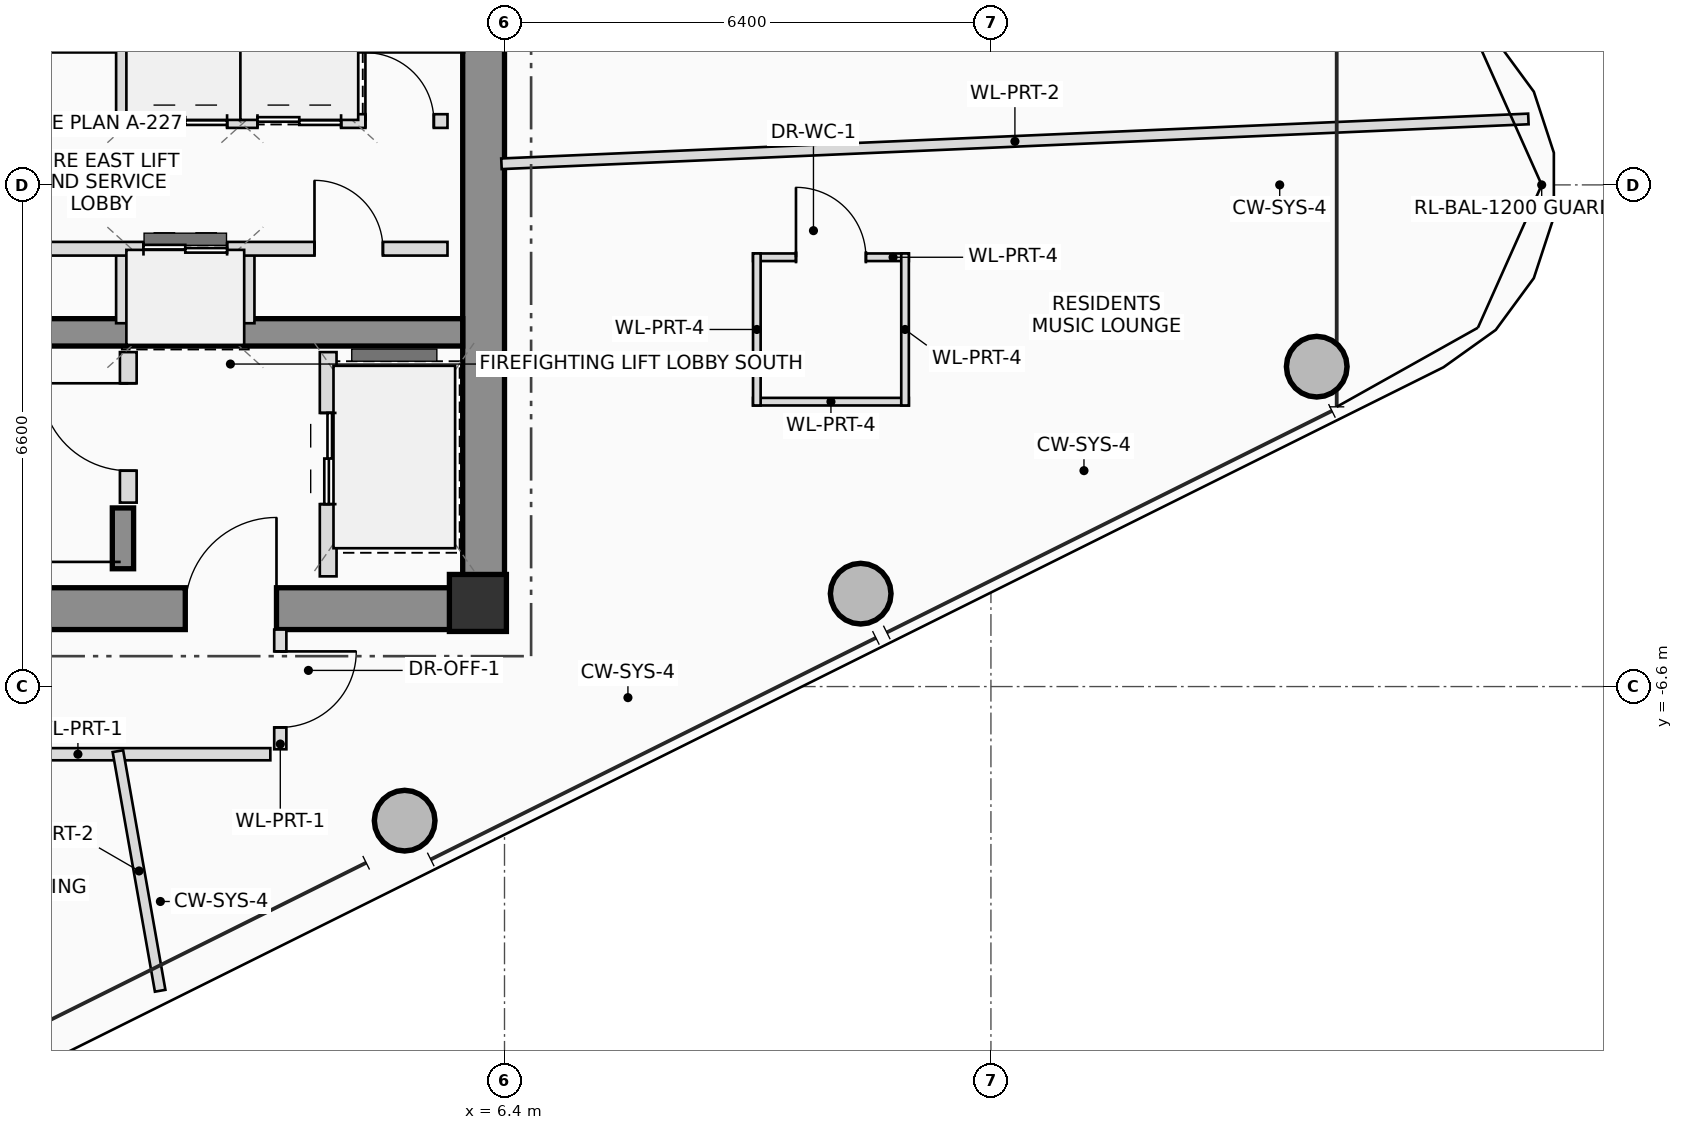
"""IFC4 building model, lengths in metres.
Left out: names, types, materials, properties, quantities, classifications, styles, units other than length and angle.
Written with IfcOpenShell. Run it as: python <this file> out.ifc"""

import sys

from ifc_helpers import new_model, si_unit, direction, frame, frame_2d, origin, origin_2d, place, context, subcontext, project, spatial, rectangle, hollow_circle, extrude, source, transform, mapped, element, fill, save


model = new_model("IFC4")
c1 = context("Model", 3, precision=1e-05, world=origin(), true_north=direction((0.0, 1.0)))
c2 = subcontext(c1, "Body", "Model", "MODEL_VIEW")
j1 = project(units=[si_unit("LENGTHUNIT", "METRE"), si_unit("PLANEANGLEUNIT", "RADIAN")], contexts=[c1])
p1 = place(None, origin())
s1 = spatial("IfcSite", under=j1, at=p1, CompositionType="ELEMENT")
p2 = place(p1, origin())
s2 = spatial("IfcBuilding", under=s1, at=p2, CompositionType="ELEMENT")
p3 = place(p2, frame((0.0, 0.0, 307.1)))
s3 = spatial("IfcBuildingStorey", under=s2, at=p3, CompositionType="ELEMENT", Elevation=307.1)
m1 = source(origin(), c2, "Body", "SweptSolid", [
    extrude(rectangle(XDim=0.75, YDim=0.75, at=origin_2d()), origin(), (0.0, 0.0, 1.0), 3.45),
])
p4 = place(p3, frame((6.05, -5.5, 0.0), z_axis=(0.0, 0.0, 1.0), x_axis=(1.0, 0.0, 0.0)))
e1 = element("IfcColumn", 1, at=p4, inside=s3, PredefinedType="COLUMN", context=c2, shape_type="MappedRepresentation", body=[
    mapped(m1, transform((0.0, 0.0, 0.0), scale=1.0)),
])
p5 = place(p3, frame((-6.4, -5.575, 0.0), z_axis=(0.0, 0.0, 1.0), x_axis=(1.0, 0.0, 0.0)))
e2 = element("IfcWall", 2, at=p5, inside=s3, PredefinedType="SHEAR", context=c2, shape_type="SweptSolid", body=[
    extrude(rectangle(XDim=12.8, YDim=0.55, at=frame_2d((6.4, 0.0))), origin(), (0.0, 0.0, 1.0), 3.45),
])
p6 = place(p5, frame((8.6, 0.0, 0.0)))
e3 = element("IfcOpeningElement", 3, at=p6, cuts=e2, PredefinedType="OPENING", context=c2, shape_type="SweptSolid", body=[
    extrude(rectangle(XDim=1.2, YDim=2.2, at=frame_2d((0.6, 1.1))), frame((0.0, 0.285, 0.0), z_axis=(0.0, -1.0, 0.0), x_axis=(1.0, 0.0, 0.0)), (0.0, 0.0, 1.0), 0.57),
])
p7 = place(p3, frame((6.125, -5.3, 0.0), z_axis=(0.0, 0.0, 1.0), x_axis=(0.0, 1.0, 0.0)))
e4 = element("IfcWall", 4, at=p7, inside=s3, PredefinedType="SHEAR", context=c2, shape_type="SweptSolid", body=[
    extrude(rectangle(XDim=10.6, YDim=0.55, at=frame_2d((5.3, 0.0))), origin(), (0.0, 0.0, 1.0), 3.45),
])
p8 = place(p3, frame((-5.85, -1.94, 0.0), z_axis=(0.0, 0.0, 1.0), x_axis=(1.0, 0.0, 0.0)))
e5 = element("IfcWall", 5, at=p8, inside=s3, PredefinedType="SHEAR", context=c2, shape_type="SweptSolid", body=[
    extrude(rectangle(XDim=11.7, YDim=0.36, at=frame_2d((5.85, 0.0))), origin(), (0.0, 0.0, 1.0), 3.45),
])
p9 = place(p3, frame((1.38, -5.05, 0.0), z_axis=(0.0, 0.0, 1.0), x_axis=(0.0, 1.0, 0.0)))
e6 = element("IfcWall", 6, at=p9, inside=s3, PredefinedType="SHEAR", context=c2, shape_type="SweptSolid", body=[
    extrude(rectangle(XDim=0.8, YDim=0.28, at=frame_2d((0.4, 0.0))), origin(), (0.0, 0.0, 1.0), 3.45),
])
m2 = source(origin(), c2, "Body", "SweptSolid", [
    extrude(hollow_circle(Radius=0.4, WallThickness=0.028, at=origin_2d()), origin(), (0.0, 0.0, 1.0), 3.45),
])
for number, where, z_axis, x_axis in (
    (7, (5.086, -8.364, 0.0), (0.0, 0.0, 1.0), (1.0, 0.0, 0.0)),
    (8, (11.086, -5.378, 0.0), (0.0, 0.0, 1.0), (1.0, 0.0, 0.0)),
    (9, (17.087, -2.392, 0.0), (0.0, 0.0, 1.0), (1.0, 0.0, 0.0)),
):
    element("IfcColumn", number, at=place(p3, frame(where, z_axis=z_axis, x_axis=x_axis)), inside=s3, PredefinedType="COLUMN", context=c2, shape_type="MappedRepresentation", body=[
        mapped(m2, transform((0.0, 0.0, 0.0), scale=1.0)),
    ])
p10 = place(p3, frame((1.45, -4.18, 0.0), z_axis=(0.0, 0.0, 1.0), x_axis=(0.0, 1.0, 0.0)))
e10 = element("IfcWall", 10, at=p10, inside=s3, PredefinedType="PLUMBINGWALL", context=c2, shape_type="SweptSolid", body=[
    extrude(rectangle(XDim=1.98, YDim=0.22, at=frame_2d((0.99, 0.0))), origin(), (0.0, 0.0, 1.0), 3.25),
])
p11 = place(p10, frame((0.42, 0.0, 0.0)))
e11 = element("IfcOpeningElement", 11, at=p11, cuts=e10, PredefinedType="OPENING", context=c2, shape_type="SweptSolid", body=[
    extrude(rectangle(XDim=1.15, YDim=2.15, at=frame_2d((0.575, 1.075))), frame((0.0, 0.12, 0.0), z_axis=(0.0, -1.0, 0.0), x_axis=(1.0, 0.0, 0.0)), (0.0, 0.0, 1.0), 0.24),
])
p12 = place(p3, frame((4.08, -5.15, 0.0), z_axis=(0.0, 0.0, 1.0), x_axis=(0.0, 1.0, 0.0)))
e12 = element("IfcWall", 12, at=p12, inside=s3, PredefinedType="PLUMBINGWALL", context=c2, shape_type="SweptSolid", body=[
    extrude(rectangle(XDim=2.95, YDim=0.22, at=frame_2d((1.475, 0.0))), origin(), (0.0, 0.0, 1.0), 3.25),
])
p13 = place(p12, frame((0.95, 0.0, 0.0)))
e13 = element("IfcOpeningElement", 13, at=p13, cuts=e12, PredefinedType="OPENING", context=c2, shape_type="SweptSolid", body=[
    extrude(rectangle(XDim=1.2, YDim=2.25, at=frame_2d((0.6, 1.125))), frame((0.0, 0.12, 0.0), z_axis=(0.0, -1.0, 0.0), x_axis=(1.0, 0.0, 0.0)), (0.0, 0.0, 1.0), 0.24),
])
for number, where, z_axis, x_axis in (
    (14, (1.38, 0.84, 0.0), (0.0, 0.0, 1.0), (0.0, 1.0, 0.0)),
    (15, (1.38, -1.82, 0.0), (0.0, 0.0, 1.0), (0.0, 1.0, 0.0)),
    (16, (3.02, 0.84, 0.0), (0.0, 0.0, 1.0), (0.0, 1.0, 0.0)),
    (17, (4.38, 0.84, 0.0), (0.0, 0.0, 1.0), (0.0, 1.0, 0.0)),
    (18, (3.02, -1.82, 0.0), (0.0, 0.0, 1.0), (0.0, 1.0, 0.0)),
):
    element("IfcWall", number, at=place(p3, frame(where, z_axis=z_axis, x_axis=x_axis)), inside=s3, PredefinedType="PLUMBINGWALL", context=c2, shape_type="SweptSolid", body=[
        extrude(rectangle(XDim=0.98, YDim=0.18, at=frame_2d((0.49, 0.0))), origin(), (0.0, 0.0, 1.0), 3.25),
    ])
p14 = place(p3, frame((-5.68, 0.84, 0.0), z_axis=(0.0, 0.0, 1.0), x_axis=(1.0, 0.0, 0.0)))
e19 = element("IfcWall", 19, at=p14, inside=s3, PredefinedType="PLUMBINGWALL", context=c2, shape_type="SweptSolid", body=[
    extrude(rectangle(XDim=11.33, YDim=0.18, at=frame_2d((5.665, 0.0))), origin(), (0.0, 0.0, 1.0), 3.25),
])
p15 = place(p14, frame((3.13, 0.0, 0.0)))
e20 = element("IfcOpeningElement", 20, at=p15, cuts=e19, PredefinedType="OPENING", context=c2, shape_type="SweptSolid", body=[
    extrude(rectangle(XDim=0.9, YDim=2.05, at=frame_2d((0.45, 1.025))), frame((0.0, 0.1, 0.0), z_axis=(0.0, -1.0, 0.0), x_axis=(1.0, 0.0, 0.0)), (0.0, 0.0, 1.0), 0.2),
])
p16 = place(p14, frame((7.33, 0.0, 0.0)))
e21 = element("IfcOpeningElement", 21, at=p16, cuts=e19, PredefinedType="OPENING", context=c2, shape_type="SweptSolid", body=[
    extrude(rectangle(XDim=1.1, YDim=2.2, at=frame_2d((0.55, 1.1))), frame((0.0, 0.1, 0.0), z_axis=(0.0, -1.0, 0.0), x_axis=(1.0, 0.0, 0.0)), (0.0, 0.0, 1.0), 0.2),
])
p17 = place(p14, frame((8.83, 0.0, 0.0)))
e22 = element("IfcOpeningElement", 22, at=p17, cuts=e19, PredefinedType="OPENING", context=c2, shape_type="SweptSolid", body=[
    extrude(rectangle(XDim=1.1, YDim=2.2, at=frame_2d((0.55, 1.1))), frame((0.0, 0.1, 0.0), z_axis=(0.0, -1.0, 0.0), x_axis=(1.0, 0.0, 0.0)), (0.0, 0.0, 1.0), 0.2),
])
p18 = place(p14, frame((10.25, 0.0, 0.0)))
e23 = element("IfcOpeningElement", 23, at=p18, cuts=e19, PredefinedType="OPENING", context=c2, shape_type="SweptSolid", body=[
    extrude(rectangle(XDim=0.9, YDim=2.05, at=frame_2d((0.45, 1.025))), frame((0.0, 0.1, 0.0), z_axis=(0.0, -1.0, 0.0), x_axis=(1.0, 0.0, 0.0)), (0.0, 0.0, 1.0), 0.2),
])
p19 = place(p3, frame((-5.68, -0.84, 0.0), z_axis=(0.0, 0.0, 1.0), x_axis=(1.0, 0.0, 0.0)))
e24 = element("IfcWall", 24, at=p19, inside=s3, PredefinedType="PLUMBINGWALL", context=c2, shape_type="SweptSolid", body=[
    extrude(rectangle(XDim=11.33, YDim=0.18, at=frame_2d((5.665, 0.0))), origin(), (0.0, 0.0, 1.0), 3.25),
])
p20 = place(p19, frame((3.13, 0.0, 0.0)))
e25 = element("IfcOpeningElement", 25, at=p20, cuts=e24, PredefinedType="OPENING", context=c2, shape_type="SweptSolid", body=[
    extrude(rectangle(XDim=0.9, YDim=2.05, at=frame_2d((0.45, 1.025))), frame((0.0, 0.1, 0.0), z_axis=(0.0, -1.0, 0.0), x_axis=(1.0, 0.0, 0.0)), (0.0, 0.0, 1.0), 0.2),
])
p21 = place(p19, frame((7.33, 0.0, 0.0)))
e26 = element("IfcOpeningElement", 26, at=p21, cuts=e24, PredefinedType="OPENING", context=c2, shape_type="SweptSolid", body=[
    extrude(rectangle(XDim=1.1, YDim=2.2, at=frame_2d((0.55, 1.1))), frame((0.0, 0.1, 0.0), z_axis=(0.0, -1.0, 0.0), x_axis=(1.0, 0.0, 0.0)), (0.0, 0.0, 1.0), 0.2),
])
p22 = place(p19, frame((9.58, 0.0, 0.0)))
e27 = element("IfcOpeningElement", 27, at=p22, cuts=e24, PredefinedType="OPENING", context=c2, shape_type="SweptSolid", body=[
    extrude(rectangle(XDim=0.9, YDim=2.05, at=frame_2d((0.45, 1.025))), frame((0.0, 0.1, 0.0), z_axis=(0.0, -1.0, 0.0), x_axis=(1.0, 0.0, 0.0)), (0.0, 0.0, 1.0), 0.2),
])
p23 = place(p3, frame((9.67, -0.952, 0.0), z_axis=(0.0, 0.0, 1.0), x_axis=(1.0, 0.0, 0.0)))
e28 = element("IfcWall", 28, at=p23, inside=s3, PredefinedType="PARTITIONING", context=c2, shape_type="SweptSolid", body=[
    extrude(rectangle(XDim=2.05, YDim=0.1, at=frame_2d((1.025, 0.0))), origin(), (0.0, 0.0, 1.0), 2.905),
])
p24 = place(p23, frame((0.565, 0.0, 0.0)))
e29 = element("IfcOpeningElement", 29, at=p24, cuts=e28, PredefinedType="OPENING", context=c2, shape_type="SweptSolid", body=[
    extrude(rectangle(XDim=0.92, YDim=2.1, at=frame_2d((0.46, 1.05))), frame((0.0, 0.06, 0.0), z_axis=(0.0, -1.0, 0.0), x_axis=(1.0, 0.0, 0.0)), (0.0, 0.0, 1.0), 0.12),
])
p25 = place(p3, frame((11.72, -2.852, 0.0), z_axis=(0.0, 0.0, 1.0), x_axis=(-1.0, 0.0, 0.0)))
e30 = element("IfcWall", 30, at=p25, inside=s3, PredefinedType="PARTITIONING", context=c2, shape_type="SweptSolid", body=[
    extrude(rectangle(XDim=2.05, YDim=0.1, at=frame_2d((1.025, 0.0))), origin(), (0.0, 0.0, 1.0), 2.905),
])
for number, where, z_axis, x_axis in (
    (31, (11.67, -0.902, 0.0), (0.0, 0.0, 1.0), (0.0, -1.0, 0.0)),
    (32, (9.72, -2.902, 0.0), (0.0, 0.0, 1.0), (0.0, 1.0, 0.0)),
):
    element("IfcWall", number, at=place(p3, frame(where, z_axis=z_axis, x_axis=x_axis)), inside=s3, PredefinedType="PARTITIONING", context=c2, shape_type="SweptSolid", body=[
        extrude(rectangle(XDim=2.0, YDim=0.1, at=frame_2d((1.0, 0.0))), origin(), (0.0, 0.0, 1.0), 3.25),
    ])
p26 = place(p3, frame((3.45, -5.85, 0.0), z_axis=(0.0, 0.0, 1.0), x_axis=(0.0, -1.0, 0.0)))
e33 = element("IfcWall", 33, at=p26, inside=s3, PredefinedType="PARTITIONING", context=c2, shape_type="SweptSolid", body=[
    extrude(rectangle(XDim=1.575, YDim=0.16, at=frame_2d((0.787, 0.0))), origin(), (0.0, 0.0, 1.0), 2.855),
])
p27 = place(p26, frame((0.287, 0.0, 0.0)))
e34 = element("IfcOpeningElement", 34, at=p27, cuts=e33, PredefinedType="OPENING", context=c2, shape_type="SweptSolid", body=[
    extrude(rectangle(XDim=1.0, YDim=2.25, at=frame_2d((0.5, 1.125))), frame((0.0, 0.09, 0.0), z_axis=(0.0, -1.0, 0.0), x_axis=(1.0, 0.0, 0.0)), (0.0, 0.0, 1.0), 0.18),
])
p28 = place(p3, frame((3.319, -7.49, 0.0), z_axis=(0.0, 0.0, 1.0), x_axis=(-1.0, 0.0, 0.0)))
e35 = element("IfcWall", 35, at=p28, inside=s3, PredefinedType="PARTITIONING", context=c2, shape_type="SweptSolid", body=[
    extrude(rectangle(XDim=9.679, YDim=0.16, at=frame_2d((4.84, 0.0))), origin(), (0.0, 0.0, 1.0), 2.655),
])
p29 = place(p28, frame((5.213, 0.0, 0.0)))
e36 = element("IfcOpeningElement", 36, at=p29, cuts=e35, PredefinedType="OPENING", context=c2, shape_type="SweptSolid", body=[
    extrude(rectangle(XDim=1.05, YDim=2.2, at=frame_2d((0.525, 1.1))), frame((0.0, 0.09, 0.0), z_axis=(0.0, -1.0, 0.0), x_axis=(1.0, 0.0, 0.0)), (0.0, 0.0, 1.0), 0.18),
])
p30 = place(p3, frame((6.36, 0.278, 0.0), z_axis=(0.0, 0.0, 1.0), x_axis=(0.999047623791, 0.043633076864, 0.0)))
e37 = element("IfcWall", 37, at=p30, inside=s3, PredefinedType="PARTITIONING", context=c2, shape_type="SweptSolid", body=[
    extrude(rectangle(XDim=13.524, YDim=0.14, at=frame_2d((6.762, 0.0))), origin(), (0.0, 0.0, 1.0), 2.815),
])
p31 = place(p3, frame((1.314, -7.45, 0.0), z_axis=(0.0, 0.0, 1.0), x_axis=(0.173619966433, -0.984812726997, 0.0)))
e38 = element("IfcWall", 38, at=p31, inside=s3, PredefinedType="PARTITIONING", context=c2, shape_type="SweptSolid", body=[
    extrude(rectangle(XDim=3.2, YDim=0.14, at=frame_2d((1.6, 0.0))), origin(), (0.0, 0.0, 1.0), 2.815),
])
p32 = place(p6, origin())
e39 = element("IfcDoor", 39, at=p32, inside=s3, OperationType="SINGLE_SWING_RIGHT", PredefinedType="DOOR", context=c2, shape_type="SweptSolid", body=[
    extrude(rectangle(XDim=1.2, YDim=2.2, at=frame_2d((0.6, 1.1))), frame((0.0, 0.025, 0.0), z_axis=(0.0, -1.0, 0.0), x_axis=(1.0, 0.0, 0.0)), (0.0, 0.0, 1.0), 0.05),
])
fill(e3, e39)
p33 = place(p11, origin())
e40 = element("IfcDoor", 40, at=p33, inside=s3, OperationType="SINGLE_SWING_RIGHT", PredefinedType="DOOR", context=c2, shape_type="SweptSolid", body=[
    extrude(rectangle(XDim=1.15, YDim=2.15, at=frame_2d((0.575, 1.075))), frame((0.0, 0.025, 0.0), z_axis=(0.0, -1.0, 0.0), x_axis=(1.0, 0.0, 0.0)), (0.0, 0.0, 1.0), 0.05),
])
fill(e11, e40)
p34 = place(p13, origin())
e41 = element("IfcDoor", 41, at=p34, inside=s3, OperationType="DOUBLE_DOOR_SLIDING", PredefinedType="DOOR", context=c2, shape_type="SweptSolid", body=[
    extrude(rectangle(XDim=1.2, YDim=2.25, at=frame_2d((0.6, 1.125))), frame((0.0, 0.025, 0.0), z_axis=(0.0, -1.0, 0.0), x_axis=(1.0, 0.0, 0.0)), (0.0, 0.0, 1.0), 0.05),
])
fill(e13, e41)
p35 = place(p16, origin())
e42 = element("IfcDoor", 42, at=p35, inside=s3, OperationType="DOUBLE_DOOR_SLIDING", PredefinedType="DOOR", context=c2, shape_type="SweptSolid", body=[
    extrude(rectangle(XDim=1.1, YDim=2.2, at=frame_2d((0.55, 1.1))), frame((0.0, 0.025, 0.0), z_axis=(0.0, -1.0, 0.0), x_axis=(1.0, 0.0, 0.0)), (0.0, 0.0, 1.0), 0.05),
])
fill(e21, e42)
p36 = place(p17, origin())
e43 = element("IfcDoor", 43, at=p36, inside=s3, OperationType="DOUBLE_DOOR_SLIDING", PredefinedType="DOOR", context=c2, shape_type="SweptSolid", body=[
    extrude(rectangle(XDim=1.1, YDim=2.2, at=frame_2d((0.55, 1.1))), frame((0.0, 0.025, 0.0), z_axis=(0.0, -1.0, 0.0), x_axis=(1.0, 0.0, 0.0)), (0.0, 0.0, 1.0), 0.05),
])
fill(e22, e43)
p37 = place(p18, origin())
e44 = element("IfcDoor", 44, at=p37, inside=s3, OperationType="SINGLE_SWING_LEFT", PredefinedType="DOOR", context=c2, shape_type="SweptSolid", body=[
    extrude(rectangle(XDim=0.9, YDim=2.05, at=frame_2d((0.45, 1.025))), frame((0.0, 0.025, 0.0), z_axis=(0.0, -1.0, 0.0), x_axis=(1.0, 0.0, 0.0)), (0.0, 0.0, 1.0), 0.05),
])
fill(e23, e44)
p38 = place(p21, origin())
e45 = element("IfcDoor", 45, at=p38, inside=s3, OperationType="DOUBLE_DOOR_SLIDING", PredefinedType="DOOR", context=c2, shape_type="SweptSolid", body=[
    extrude(rectangle(XDim=1.1, YDim=2.2, at=frame_2d((0.55, 1.1))), frame((0.0, 0.025, 0.0), z_axis=(0.0, -1.0, 0.0), x_axis=(1.0, 0.0, 0.0)), (0.0, 0.0, 1.0), 0.05),
])
fill(e26, e45)
p39 = place(p22, origin())
e46 = element("IfcDoor", 46, at=p39, inside=s3, OperationType="SINGLE_SWING_LEFT", PredefinedType="DOOR", context=c2, shape_type="SweptSolid", body=[
    extrude(rectangle(XDim=0.9, YDim=2.05, at=frame_2d((0.45, 1.025))), frame((0.0, 0.025, 0.0), z_axis=(0.0, -1.0, 0.0), x_axis=(1.0, 0.0, 0.0)), (0.0, 0.0, 1.0), 0.05),
])
fill(e27, e46)
p40 = place(p24, origin())
e47 = element("IfcDoor", 47, at=p40, inside=s3, OperationType="SINGLE_SWING_LEFT", PredefinedType="DOOR", context=c2, shape_type="SweptSolid", body=[
    extrude(rectangle(XDim=0.92, YDim=2.1, at=frame_2d((0.46, 1.05))), frame((0.0, 0.025, 0.0), z_axis=(0.0, -1.0, 0.0), x_axis=(1.0, 0.0, 0.0)), (0.0, 0.0, 1.0), 0.05),
])
fill(e29, e47)
p41 = place(p27, origin())
e48 = element("IfcDoor", 48, at=p41, inside=s3, OperationType="SINGLE_SWING_LEFT", PredefinedType="DOOR", context=c2, shape_type="SweptSolid", body=[
    extrude(rectangle(XDim=1.0, YDim=2.25, at=frame_2d((0.5, 1.125))), frame((0.0, 0.025, 0.0), z_axis=(0.0, -1.0, 0.0), x_axis=(1.0, 0.0, 0.0)), (0.0, 0.0, 1.0), 0.05),
])
fill(e34, e48)
save(model, sys.argv[1])
